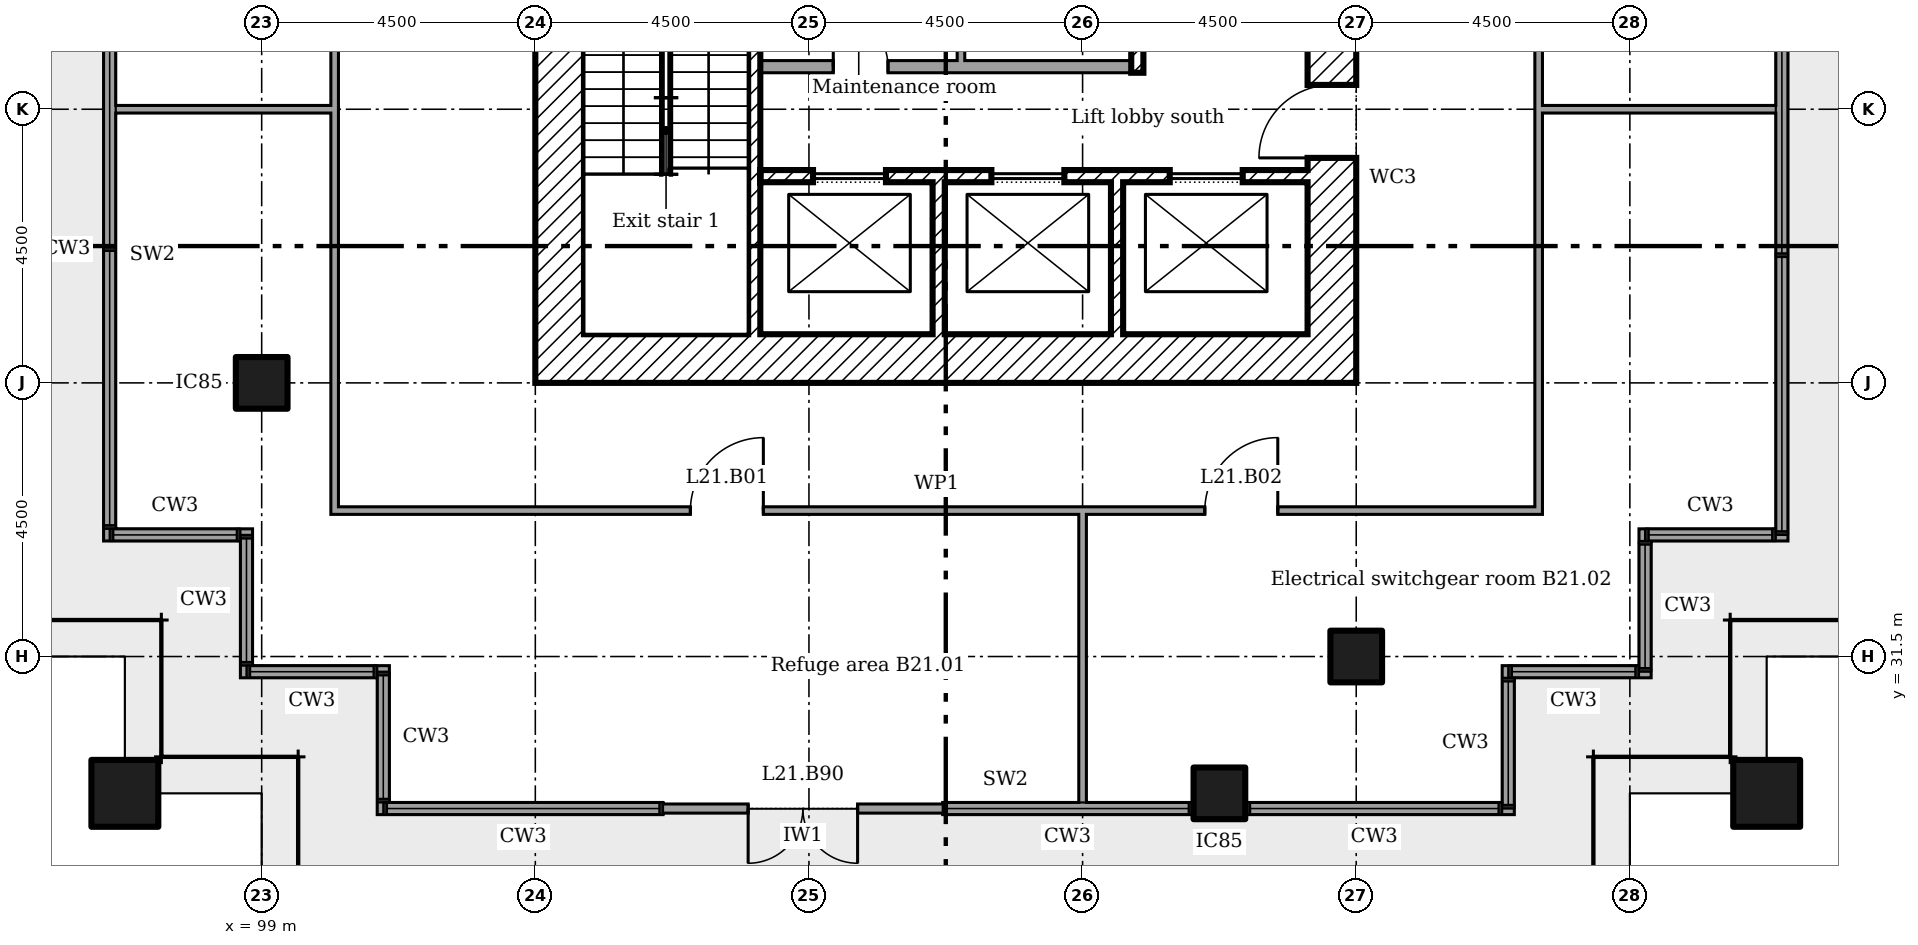
"""IFC4 building model, lengths in metres.
Left out: names, types, materials, properties, quantities, classifications, styles, units other than length and angle.
Written with IfcOpenShell. Run it as: python <this file> out.ifc"""

import sys

from ifc_helpers import new_model, si_unit, direction, frame, frame_2d, origin, origin_2d, place, context, subcontext, project, spatial, rectangle, extrude, element, fill, save


model = new_model("IFC4")
c1 = context("Model", 3, precision=1e-05, world=origin(), true_north=direction((0.0, 1.0)))
c2 = subcontext(c1, "Body", "Model", "MODEL_VIEW")
j1 = project(units=[si_unit("LENGTHUNIT", "METRE"), si_unit("PLANEANGLEUNIT", "RADIAN")], contexts=[c1])
p1 = place(None, origin())
s1 = spatial("IfcSite", under=j1, at=p1, CompositionType="ELEMENT")
p2 = place(p1, origin())
s2 = spatial("IfcBuilding", under=s1, at=p2, CompositionType="ELEMENT")
p3 = place(p2, frame((0.0, 0.0, 87.0)))
s3 = spatial("IfcBuildingStorey", under=s2, at=p3, CompositionType="ELEMENT", Elevation=87.0)
for number, where in (
    (1, (123.75, 29.25, 0.0)),
    (2, (96.75, 29.25, 0.0)),
):
    element("IfcColumn", number, at=place(p3, frame(where)), inside=s3, PredefinedType="COLUMN", context=c2, shape_type="SweptSolid", body=[
        extrude(rectangle(XDim=1.1, YDim=1.1, at=origin_2d()), origin(), (0.0, 0.0, 1.0), 5.0),
    ])
for number, where in (
    (3, (99.0, 36.0, 0.0)),
    (4, (114.75, 29.25, 0.0)),
    (5, (117.0, 31.5, 0.0)),
):
    element("IfcColumn", number, at=place(p3, frame(where)), inside=s3, PredefinedType="COLUMN", context=c2, shape_type="SweptSolid", body=[
        extrude(rectangle(XDim=0.85, YDim=0.85, at=origin_2d()), origin(), (0.0, 0.0, 1.0), 5.0),
    ])
p4 = place(p3, frame((96.5, 42.8, 0.0), z_axis=(0.0, 0.0, 1.0), x_axis=(0.0, -1.0, 0.0)))
e6 = element("IfcWall", 6, at=p4, inside=s3, PredefinedType="ELEMENTEDWALL", context=c2, shape_type="SweptSolid", body=[
    extrude(rectangle(XDim=9.4, YDim=0.2, at=frame_2d((4.7, 0.0))), origin(), (0.0, 0.0, 1.0), 1.8),
])
p5 = place(p3, frame((96.6, 33.5, 0.0)))
e7 = element("IfcWall", 7, at=p5, inside=s3, PredefinedType="ELEMENTEDWALL", context=c2, shape_type="SweptSolid", body=[
    extrude(rectangle(XDim=2.25, YDim=0.2, at=frame_2d((1.125, 0.0))), origin(), (0.0, 0.0, 1.0), 1.8),
])
p6 = place(p3, frame((98.75, 33.4, 0.0), z_axis=(0.0, 0.0, 1.0), x_axis=(0.0, -1.0, 0.0)))
e8 = element("IfcWall", 8, at=p6, inside=s3, PredefinedType="ELEMENTEDWALL", context=c2, shape_type="SweptSolid", body=[
    extrude(rectangle(XDim=2.25, YDim=0.2, at=frame_2d((1.125, 0.0))), origin(), (0.0, 0.0, 1.0), 1.8),
])
p7 = place(p3, frame((98.85, 31.25, 0.0)))
e9 = element("IfcWall", 9, at=p7, inside=s3, PredefinedType="ELEMENTEDWALL", context=c2, shape_type="SweptSolid", body=[
    extrude(rectangle(XDim=2.25, YDim=0.2, at=frame_2d((1.125, 0.0))), origin(), (0.0, 0.0, 1.0), 1.8),
])
p8 = place(p3, frame((101.0, 31.15, 0.0), z_axis=(0.0, 0.0, 1.0), x_axis=(0.0, -1.0, 0.0)))
e10 = element("IfcWall", 10, at=p8, inside=s3, PredefinedType="ELEMENTEDWALL", context=c2, shape_type="SweptSolid", body=[
    extrude(rectangle(XDim=2.25, YDim=0.2, at=frame_2d((1.125, 0.0))), origin(), (0.0, 0.0, 1.0), 1.8),
])
p9 = place(p3, frame((101.1, 29.0, 0.0)))
e11 = element("IfcWall", 11, at=p9, inside=s3, PredefinedType="ELEMENTEDWALL", context=c2, shape_type="SweptSolid", body=[
    extrude(rectangle(XDim=4.5, YDim=0.2, at=frame_2d((2.25, 0.0))), origin(), (0.0, 0.0, 1.0), 1.8),
])
p10 = place(p3, frame((110.2, 29.0, 0.0)))
e12 = element("IfcWall", 12, at=p10, inside=s3, PredefinedType="ELEMENTEDWALL", context=c2, shape_type="SweptSolid", body=[
    extrude(rectangle(XDim=4.125, YDim=0.2, at=frame_2d((2.062, 0.0))), origin(), (0.0, 0.0, 1.0), 1.8),
])
p11 = place(p3, frame((115.175, 29.0, 0.0)))
e13 = element("IfcWall", 13, at=p11, inside=s3, PredefinedType="ELEMENTEDWALL", context=c2, shape_type="SweptSolid", body=[
    extrude(rectangle(XDim=4.425, YDim=0.2, at=frame_2d((2.212, 0.0))), origin(), (0.0, 0.0, 1.0), 1.8),
])
p12 = place(p3, frame((105.6, 29.0, 0.0)))
e14 = element("IfcWall", 14, at=p12, inside=s3, PredefinedType="SOLIDWALL", context=c2, shape_type="SweptSolid", body=[
    extrude(rectangle(XDim=4.6, YDim=0.15, at=frame_2d((2.3, 0.0))), origin(), (0.0, 0.0, 1.0), 4.85),
])
p13 = place(p12, frame((1.4, 0.0, 0.0)))
e15 = element("IfcOpeningElement", 15, at=p13, cuts=e14, PredefinedType="OPENING", context=c2, shape_type="SweptSolid", body=[
    extrude(rectangle(XDim=1.8, YDim=2.4, at=frame_2d((0.9, 1.2))), frame((0.0, 0.085, 0.0), z_axis=(0.0, -1.0, 0.0), x_axis=(1.0, 0.0, 0.0)), (0.0, 0.0, 1.0), 0.17),
])
p14 = place(p3, frame((119.5, 29.1, 0.0), z_axis=(0.0, 0.0, 1.0), x_axis=(0.0, 1.0, 0.0)))
e16 = element("IfcWall", 16, at=p14, inside=s3, PredefinedType="ELEMENTEDWALL", context=c2, shape_type="SweptSolid", body=[
    extrude(rectangle(XDim=2.25, YDim=0.2, at=frame_2d((1.125, 0.0))), origin(), (0.0, 0.0, 1.0), 1.8),
])
p15 = place(p3, frame((119.6, 31.25, 0.0)))
e17 = element("IfcWall", 17, at=p15, inside=s3, PredefinedType="ELEMENTEDWALL", context=c2, shape_type="SweptSolid", body=[
    extrude(rectangle(XDim=2.25, YDim=0.2, at=frame_2d((1.125, 0.0))), origin(), (0.0, 0.0, 1.0), 1.8),
])
p16 = place(p3, frame((121.75, 31.35, 0.0), z_axis=(0.0, 0.0, 1.0), x_axis=(0.0, 1.0, 0.0)))
e18 = element("IfcWall", 18, at=p16, inside=s3, PredefinedType="ELEMENTEDWALL", context=c2, shape_type="SweptSolid", body=[
    extrude(rectangle(XDim=2.25, YDim=0.2, at=frame_2d((1.125, 0.0))), origin(), (0.0, 0.0, 1.0), 1.8),
])
p17 = place(p3, frame((121.85, 33.5, 0.0)))
e19 = element("IfcWall", 19, at=p17, inside=s3, PredefinedType="ELEMENTEDWALL", context=c2, shape_type="SweptSolid", body=[
    extrude(rectangle(XDim=2.25, YDim=0.2, at=frame_2d((1.125, 0.0))), origin(), (0.0, 0.0, 1.0), 1.8),
])
p18 = place(p3, frame((124.0, 33.6, 0.0), z_axis=(0.0, 0.0, 1.0), x_axis=(0.0, 1.0, 0.0)))
e20 = element("IfcWall", 20, at=p18, inside=s3, PredefinedType="ELEMENTEDWALL", context=c2, shape_type="SweptSolid", body=[
    extrude(rectangle(XDim=18.5, YDim=0.2, at=frame_2d((9.25, 0.0))), origin(), (0.0, 0.0, 1.0), 1.8),
])
p19 = place(p3, frame((116.6, 36.0, 0.0), z_axis=(0.0, 0.0, 1.0), x_axis=(0.0, 1.0, 0.0)))
e21 = element("IfcWall", 21, at=p19, inside=s3, PredefinedType="SHEAR", context=c2, shape_type="SweptSolid", body=[
    extrude(rectangle(XDim=13.5, YDim=0.8, at=frame_2d((6.75, 0.0))), origin(), (0.0, 0.0, 1.0), 4.75),
])
p20 = place(p19, frame((3.7, 0.0, 0.0)))
e22 = element("IfcOpeningElement", 22, at=p20, cuts=e21, PredefinedType="OPENING", context=c2, shape_type="SweptSolid", body=[
    extrude(rectangle(XDim=1.2, YDim=2.1, at=frame_2d((0.6, 1.05))), frame((0.0, 0.41, 0.0), z_axis=(0.0, -1.0, 0.0), x_axis=(1.0, 0.0, 0.0)), (0.0, 0.0, 1.0), 0.82),
])
p21 = place(p19, frame((6.275, 0.0, 0.0)))
e23 = element("IfcOpeningElement", 23, at=p21, cuts=e21, PredefinedType="OPENING", context=c2, shape_type="SweptSolid", body=[
    extrude(rectangle(XDim=1.0, YDim=2.1, at=frame_2d((0.5, 1.05))), frame((0.0, 0.41, 0.0), z_axis=(0.0, -1.0, 0.0), x_axis=(1.0, 0.0, 0.0)), (0.0, 0.0, 1.0), 0.82),
])
p22 = place(p3, frame((104.3, 36.4, 0.0)))
e24 = element("IfcWall", 24, at=p22, inside=s3, PredefinedType="SHEAR", context=c2, shape_type="SweptSolid", body=[
    extrude(rectangle(XDim=11.9, YDim=0.8, at=frame_2d((5.95, 0.0))), origin(), (0.0, 0.0, 1.0), 4.75),
])
p23 = place(p3, frame((103.9, 36.0, 0.0), z_axis=(0.0, 0.0, 1.0), x_axis=(0.0, 1.0, 0.0)))
e25 = element("IfcWall", 25, at=p23, inside=s3, PredefinedType="SHEAR", context=c2, shape_type="SweptSolid", body=[
    extrude(rectangle(XDim=13.5, YDim=0.8, at=frame_2d((6.75, 0.0))), origin(), (0.0, 0.0, 1.0), 4.75),
])
p24 = place(p23, frame((8.2, 0.0, 0.0)))
e26 = element("IfcOpeningElement", 26, at=p24, cuts=e25, PredefinedType="OPENING", context=c2, shape_type="SweptSolid", body=[
    extrude(rectangle(XDim=1.2, YDim=2.1, at=frame_2d((0.6, 1.05))), frame((0.0, 0.41, 0.0), z_axis=(0.0, -1.0, 0.0), x_axis=(1.0, 0.0, 0.0)), (0.0, 0.0, 1.0), 0.82),
])
p25 = place(p23, frame((6.225, 0.0, 0.0)))
e27 = element("IfcOpeningElement", 27, at=p25, cuts=e25, PredefinedType="OPENING", context=c2, shape_type="SweptSolid", body=[
    extrude(rectangle(XDim=1.0, YDim=2.1, at=frame_2d((0.5, 1.05))), frame((0.0, 0.41, 0.0), z_axis=(0.0, -1.0, 0.0), x_axis=(1.0, 0.0, 0.0)), (0.0, 0.0, 1.0), 0.82),
])
for number, where, z_axis, x_axis in (
    (28, (110.133, 36.8, 0.0), (0.0, 0.0, 1.0), (0.0, 1.0, 0.0)),
    (29, (113.067, 36.8, 0.0), (0.0, 0.0, 1.0), (0.0, 1.0, 0.0)),
):
    element("IfcWall", number, at=place(p3, frame(where, z_axis=z_axis, x_axis=x_axis)), inside=s3, PredefinedType="SHEAR", context=c2, shape_type="SweptSolid", body=[
        extrude(rectangle(XDim=2.5, YDim=0.2, at=frame_2d((1.25, 0.0))), origin(), (0.0, 0.0, 1.0), 4.75),
    ])
p26 = place(p3, frame((107.2, 39.4, 0.0)))
e30 = element("IfcWall", 30, at=p26, inside=s3, PredefinedType="SHEAR", context=c2, shape_type="SweptSolid", body=[
    extrude(rectangle(XDim=9.0, YDim=0.2, at=frame_2d((4.5, 0.0))), origin(), (0.0, 0.0, 1.0), 4.75),
])
p27 = place(p26, frame((0.867, 0.0, 0.0)))
e31 = element("IfcOpeningElement", 31, at=p27, cuts=e30, PredefinedType="OPENING", context=c2, shape_type="SweptSolid", body=[
    extrude(rectangle(XDim=1.2, YDim=2.1, at=frame_2d((0.6, 1.05))), frame((0.0, 0.11, 0.0), z_axis=(0.0, -1.0, 0.0), x_axis=(1.0, 0.0, 0.0)), (0.0, 0.0, 1.0), 0.22),
])
p28 = place(p26, frame((3.8, 0.0, 0.0)))
e32 = element("IfcOpeningElement", 32, at=p28, cuts=e30, PredefinedType="OPENING", context=c2, shape_type="SweptSolid", body=[
    extrude(rectangle(XDim=1.2, YDim=2.1, at=frame_2d((0.6, 1.05))), frame((0.0, 0.11, 0.0), z_axis=(0.0, -1.0, 0.0), x_axis=(1.0, 0.0, 0.0)), (0.0, 0.0, 1.0), 0.22),
])
p29 = place(p26, frame((6.733, 0.0, 0.0)))
e33 = element("IfcOpeningElement", 33, at=p29, cuts=e30, PredefinedType="OPENING", context=c2, shape_type="SweptSolid", body=[
    extrude(rectangle(XDim=1.2, YDim=2.1, at=frame_2d((0.6, 1.05))), frame((0.0, 0.11, 0.0), z_axis=(0.0, -1.0, 0.0), x_axis=(1.0, 0.0, 0.0)), (0.0, 0.0, 1.0), 0.22),
])
p30 = place(p3, frame((107.1, 36.8, 0.0), z_axis=(0.0, 0.0, 1.0), x_axis=(0.0, 1.0, 0.0)))
e34 = element("IfcWall", 34, at=p30, inside=s3, PredefinedType="SHEAR", context=c2, shape_type="SweptSolid", body=[
    extrude(rectangle(XDim=6.9, YDim=0.2, at=frame_2d((3.45, 0.0))), origin(), (0.0, 0.0, 1.0), 4.75),
])
p31 = place(p3, frame((113.4, 41.1, 0.0), z_axis=(0.0, 0.0, 1.0), x_axis=(0.0, 1.0, 0.0)))
e35 = element("IfcWall", 35, at=p31, inside=s3, PredefinedType="SHEAR", context=c2, shape_type="SweptSolid", body=[
    extrude(rectangle(XDim=7.6, YDim=0.2, at=frame_2d((3.8, 0.0))), origin(), (0.0, 0.0, 1.0), 4.75),
])
p32 = place(p3, frame((107.2, 41.2, 0.0)))
e36 = element("IfcWall", 36, at=p32, inside=s3, PredefinedType="PARTITIONING", context=c2, shape_type="SweptSolid", body=[
    extrude(rectangle(XDim=6.1, YDim=0.2, at=frame_2d((3.05, 0.0))), origin(), (0.0, 0.0, 1.0), 4.75),
])
p33 = place(p32, frame((1.2, 0.0, 0.0)))
e37 = element("IfcOpeningElement", 37, at=p33, cuts=e36, PredefinedType="OPENING", context=c2, shape_type="SweptSolid", body=[
    extrude(rectangle(XDim=0.9, YDim=2.1, at=frame_2d((0.45, 1.05))), frame((0.0, 0.11, 0.0), z_axis=(0.0, -1.0, 0.0), x_axis=(1.0, 0.0, 0.0)), (0.0, 0.0, 1.0), 0.22),
])
p34 = place(p3, frame((110.5, 41.3, 0.0), z_axis=(0.0, 0.0, 1.0), x_axis=(0.0, 1.0, 0.0)))
e38 = element("IfcWall", 38, at=p34, inside=s3, PredefinedType="PARTITIONING", context=c2, shape_type="SweptSolid", body=[
    extrude(rectangle(XDim=1.7, YDim=0.125, at=frame_2d((0.85, 0.0))), origin(), (0.0, 0.0, 1.0), 4.75),
])
p35 = place(p3, frame((100.137, 33.9, 0.0)))
e39 = element("IfcWall", 39, at=p35, inside=s3, PredefinedType="PARTITIONING", context=c2, shape_type="SweptSolid", body=[
    extrude(rectangle(XDim=19.925, YDim=0.125, at=frame_2d((9.962, 0.0))), origin(), (0.0, 0.0, 1.0), 4.85),
])
p36 = place(p35, frame((5.913, 0.0, 0.0)))
e40 = element("IfcOpeningElement", 40, at=p36, cuts=e39, PredefinedType="OPENING", context=c2, shape_type="SweptSolid", body=[
    extrude(rectangle(XDim=1.2, YDim=2.1, at=frame_2d((0.6, 1.05))), frame((0.0, 0.073, 0.0), z_axis=(0.0, -1.0, 0.0), x_axis=(1.0, 0.0, 0.0)), (0.0, 0.0, 1.0), 0.145),
])
p37 = place(p35, frame((14.373, 0.0, 0.0)))
e41 = element("IfcOpeningElement", 41, at=p37, cuts=e39, PredefinedType="OPENING", context=c2, shape_type="SweptSolid", body=[
    extrude(rectangle(XDim=1.2, YDim=2.1, at=frame_2d((0.6, 1.05))), frame((0.0, 0.073, 0.0), z_axis=(0.0, -1.0, 0.0), x_axis=(1.0, 0.0, 0.0)), (0.0, 0.0, 1.0), 0.145),
])
p38 = place(p3, frame((96.6, 40.5, 0.0)))
e42 = element("IfcWall", 42, at=p38, inside=s3, PredefinedType="PARTITIONING", context=c2, shape_type="SweptSolid", body=[
    extrude(rectangle(XDim=3.6, YDim=0.125, at=frame_2d((1.8, 0.0))), origin(), (0.0, 0.0, 1.0), 4.251),
])
p39 = place(p3, frame((120.0, 40.5, 0.0)))
e43 = element("IfcWall", 43, at=p39, inside=s3, PredefinedType="PARTITIONING", context=c2, shape_type="SweptSolid", body=[
    extrude(rectangle(XDim=3.9, YDim=0.125, at=frame_2d((1.95, 0.0))), origin(), (0.0, 0.0, 1.0), 4.251),
])
p40 = place(p3, frame((100.2, 33.962, 0.0), z_axis=(0.0, 0.0, 1.0), x_axis=(0.0, 1.0, 0.0)))
e44 = element("IfcWall", 44, at=p40, inside=s3, PredefinedType="PARTITIONING", context=c2, shape_type="SweptSolid", body=[
    extrude(rectangle(XDim=17.875, YDim=0.125, at=frame_2d((8.938, 0.0))), origin(), (0.0, 0.0, 1.0), 4.85),
])
p41 = place(p40, frame((13.4, 0.0, 0.0)))
e45 = element("IfcOpeningElement", 45, at=p41, cuts=e44, PredefinedType="OPENING", context=c2, shape_type="SweptSolid", body=[
    extrude(rectangle(XDim=1.0, YDim=2.1, at=frame_2d((0.5, 1.05))), frame((0.0, 0.073, 0.0), z_axis=(0.0, -1.0, 0.0), x_axis=(1.0, 0.0, 0.0)), (0.0, 0.0, 1.0), 0.145),
])
p42 = place(p3, frame((112.5, 29.1, 0.0), z_axis=(0.0, 0.0, 1.0), x_axis=(0.0, 1.0, 0.0)))
e46 = element("IfcWall", 46, at=p42, inside=s3, PredefinedType="PARTITIONING", context=c2, shape_type="SweptSolid", body=[
    extrude(rectangle(XDim=4.8, YDim=0.125, at=frame_2d((2.4, 0.0))), origin(), (0.0, 0.0, 1.0), 4.251),
])
p43 = place(p3, frame((120.0, 33.962, 0.0), z_axis=(0.0, 0.0, 1.0), x_axis=(0.0, 1.0, 0.0)))
e47 = element("IfcWall", 47, at=p43, inside=s3, PredefinedType="PARTITIONING", context=c2, shape_type="SweptSolid", body=[
    extrude(rectangle(XDim=17.875, YDim=0.125, at=frame_2d((8.938, 0.0))), origin(), (0.0, 0.0, 1.0), 4.85),
])
p44 = place(p43, frame((8.607, 0.0, 0.0)))
e48 = element("IfcOpeningElement", 48, at=p44, cuts=e47, PredefinedType="OPENING", context=c2, shape_type="SweptSolid", body=[
    extrude(rectangle(XDim=1.2, YDim=2.1, at=frame_2d((0.6, 1.05))), frame((0.0, 0.073, 0.0), z_axis=(0.0, -1.0, 0.0), x_axis=(1.0, 0.0, 0.0)), (0.0, 0.0, 1.0), 0.145),
])
p45 = place(p13, frame((1.8, 0.0, 0.0), x_axis=(-1.0, 0.0, 0.0)))
e49 = element("IfcDoor", 49, at=p45, inside=s3, OperationType="DOUBLE_DOOR_DOUBLE_SWING", PredefinedType="NOTDEFINED", context=c2, shape_type="SweptSolid", body=[
    extrude(rectangle(XDim=1.8, YDim=2.4, at=frame_2d((0.9, 1.2))), frame((0.0, 0.025, 0.0), z_axis=(0.0, -1.0, 0.0), x_axis=(1.0, 0.0, 0.0)), (0.0, 0.0, 1.0), 0.05),
])
fill(e15, e49)
p46 = place(p20, origin())
e50 = element("IfcDoor", 50, at=p46, inside=s3, OperationType="SINGLE_SWING_RIGHT", PredefinedType="DOOR", context=c2, shape_type="SweptSolid", body=[
    extrude(rectangle(XDim=1.2, YDim=2.1, at=frame_2d((0.6, 1.05))), frame((0.0, 0.025, 0.0), z_axis=(0.0, -1.0, 0.0), x_axis=(1.0, 0.0, 0.0)), (0.0, 0.0, 1.0), 0.05),
])
fill(e22, e50)
p47 = place(p33, origin())
e51 = element("IfcDoor", 51, at=p47, inside=s3, OperationType="SINGLE_SWING_RIGHT", PredefinedType="DOOR", context=c2, shape_type="SweptSolid", body=[
    extrude(rectangle(XDim=0.9, YDim=2.1, at=frame_2d((0.45, 1.05))), frame((0.0, 0.025, 0.0), z_axis=(0.0, -1.0, 0.0), x_axis=(1.0, 0.0, 0.0)), (0.0, 0.0, 1.0), 0.05),
])
fill(e37, e51)
p48 = place(p27, origin())
e52 = element("IfcDoor", 52, at=p48, inside=s3, OperationType="SLIDING_TO_LEFT", PredefinedType="DOOR", context=c2, shape_type="SweptSolid", body=[
    extrude(rectangle(XDim=1.2, YDim=2.1, at=frame_2d((0.6, 1.05))), frame((0.0, 0.025, 0.0), z_axis=(0.0, -1.0, 0.0), x_axis=(1.0, 0.0, 0.0)), (0.0, 0.0, 1.0), 0.05),
])
fill(e31, e52)
p49 = place(p28, origin())
e53 = element("IfcDoor", 53, at=p49, inside=s3, OperationType="SLIDING_TO_LEFT", PredefinedType="DOOR", context=c2, shape_type="SweptSolid", body=[
    extrude(rectangle(XDim=1.2, YDim=2.1, at=frame_2d((0.6, 1.05))), frame((0.0, 0.025, 0.0), z_axis=(0.0, -1.0, 0.0), x_axis=(1.0, 0.0, 0.0)), (0.0, 0.0, 1.0), 0.05),
])
fill(e32, e53)
p50 = place(p29, origin())
e54 = element("IfcDoor", 54, at=p50, inside=s3, OperationType="SLIDING_TO_LEFT", PredefinedType="DOOR", context=c2, shape_type="SweptSolid", body=[
    extrude(rectangle(XDim=1.2, YDim=2.1, at=frame_2d((0.6, 1.05))), frame((0.0, 0.025, 0.0), z_axis=(0.0, -1.0, 0.0), x_axis=(1.0, 0.0, 0.0)), (0.0, 0.0, 1.0), 0.05),
])
fill(e33, e54)
p51 = place(p36, origin())
e55 = element("IfcDoor", 55, at=p51, inside=s3, OperationType="SINGLE_SWING_LEFT", PredefinedType="DOOR", context=c2, shape_type="SweptSolid", body=[
    extrude(rectangle(XDim=1.2, YDim=2.1, at=frame_2d((0.6, 1.05))), frame((0.0, 0.025, 0.0), z_axis=(0.0, -1.0, 0.0), x_axis=(1.0, 0.0, 0.0)), (0.0, 0.0, 1.0), 0.05),
])
fill(e40, e55)
p52 = place(p37, origin())
e56 = element("IfcDoor", 56, at=p52, inside=s3, OperationType="SINGLE_SWING_LEFT", PredefinedType="DOOR", context=c2, shape_type="SweptSolid", body=[
    extrude(rectangle(XDim=1.2, YDim=2.1, at=frame_2d((0.6, 1.05))), frame((0.0, 0.025, 0.0), z_axis=(0.0, -1.0, 0.0), x_axis=(1.0, 0.0, 0.0)), (0.0, 0.0, 1.0), 0.05),
])
fill(e41, e56)
save(model, sys.argv[1])
